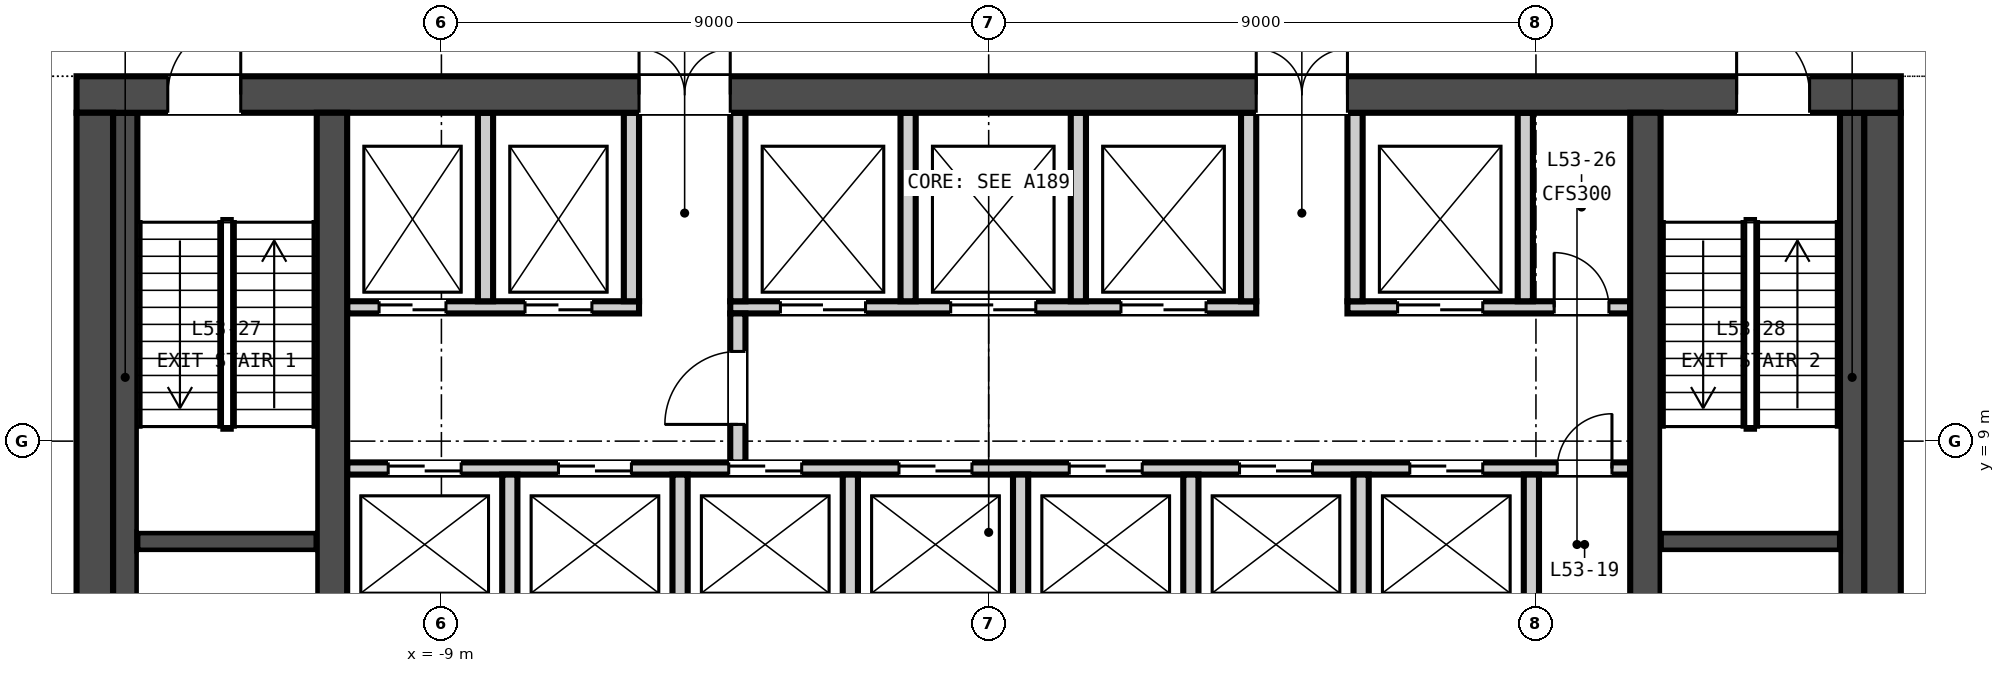
"""IFC4 building model, lengths in metres.
Left out: names, types, materials, properties, quantities, classifications, styles, units other than length and angle.
Written with IfcOpenShell. Run it as: python <this file> out.ifc"""

import sys

from ifc_helpers import new_model, si_unit, direction, frame, frame_2d, origin, place, context, subcontext, project, spatial, rectangle, extrude, element, fill, save


model = new_model("IFC4")
c1 = context("Model", 3, precision=1e-05, world=origin(), true_north=direction((0.0, 1.0)))
c2 = subcontext(c1, "Body", "Model", "MODEL_VIEW")
j1 = project(units=[si_unit("LENGTHUNIT", "METRE"), si_unit("PLANEANGLEUNIT", "RADIAN")], contexts=[c1])
p1 = place(None, origin())
s1 = spatial("IfcSite", under=j1, at=p1, CompositionType="ELEMENT")
p2 = place(p1, origin())
s2 = spatial("IfcBuilding", under=s1, at=p2, CompositionType="ELEMENT")
p3 = place(p2, frame((0.0, 0.0, 211.8)))
s3 = spatial("IfcBuildingStorey", under=s2, at=p3, CompositionType="ELEMENT", Elevation=211.8)
p4 = place(p3, frame((-15.0, 14.7, -0.3), z_axis=(0.0, 0.0, 1.0), x_axis=(1.0, 0.0, 0.0)))
e1 = element("IfcWall", 1, at=p4, inside=s3, PredefinedType="SOLIDWALL", context=c2, shape_type="SweptSolid", body=[
    extrude(rectangle(XDim=30.0, YDim=0.6, at=frame_2d((15.0, 0.0))), origin(), (0.0, 0.0, 1.0), 4.65),
])
p5 = place(p4, frame((9.25, 0.0, 0.3)))
e2 = element("IfcOpeningElement", 2, at=p5, cuts=e1, PredefinedType="OPENING", context=c2, shape_type="SweptSolid", body=[
    extrude(rectangle(XDim=1.5, YDim=2.1, at=frame_2d((0.75, 1.05))), frame((0.0, 0.31, 0.0), z_axis=(0.0, -1.0, 0.0), x_axis=(1.0, 0.0, 0.0)), (0.0, 0.0, 1.0), 0.62),
])
p6 = place(p4, frame((19.4, 0.0, 0.3)))
e3 = element("IfcOpeningElement", 3, at=p6, cuts=e1, PredefinedType="OPENING", context=c2, shape_type="SweptSolid", body=[
    extrude(rectangle(XDim=1.5, YDim=2.1, at=frame_2d((0.75, 1.05))), frame((0.0, 0.31, 0.0), z_axis=(0.0, -1.0, 0.0), x_axis=(1.0, 0.0, 0.0)), (0.0, 0.0, 1.0), 0.62),
])
p7 = place(p4, frame((1.5, 0.0, 0.3)))
e4 = element("IfcOpeningElement", 4, at=p7, cuts=e1, PredefinedType="OPENING", context=c2, shape_type="SweptSolid", body=[
    extrude(rectangle(XDim=1.2, YDim=2.1, at=frame_2d((0.6, 1.05))), frame((0.0, 0.31, 0.0), z_axis=(0.0, -1.0, 0.0), x_axis=(1.0, 0.0, 0.0)), (0.0, 0.0, 1.0), 0.62),
])
p8 = place(p4, frame((27.3, 0.0, 0.3)))
e5 = element("IfcOpeningElement", 5, at=p8, cuts=e1, PredefinedType="OPENING", context=c2, shape_type="SweptSolid", body=[
    extrude(rectangle(XDim=1.2, YDim=2.1, at=frame_2d((0.6, 1.05))), frame((0.0, 0.31, 0.0), z_axis=(0.0, -1.0, 0.0), x_axis=(1.0, 0.0, 0.0)), (0.0, 0.0, 1.0), 0.62),
])
for number, where, z_axis, x_axis in (
    (6, (-14.7, 0.6, -0.3), (0.0, 0.0, 1.0), (0.0, 1.0, 0.0)),
    (7, (14.7, 0.6, -0.3), (0.0, 0.0, 1.0), (0.0, 1.0, 0.0)),
):
    element("IfcWall", number, at=place(p3, frame(where, z_axis=z_axis, x_axis=x_axis)), inside=s3, PredefinedType="SOLIDWALL", context=c2, shape_type="SweptSolid", body=[
        extrude(rectangle(XDim=13.8, YDim=0.6, at=frame_2d((6.9, 0.0))), origin(), (0.0, 0.0, 1.0), 4.65),
    ])
for number, where, z_axis, x_axis in (
    (8, (-10.8, 0.6, -0.3), (0.0, 0.0, 1.0), (0.0, 1.0, 0.0)),
    (9, (10.8, 0.6, -0.3), (0.0, 0.0, 1.0), (0.0, 1.0, 0.0)),
):
    element("IfcWall", number, at=place(p3, frame(where, z_axis=z_axis, x_axis=x_axis)), inside=s3, PredefinedType="SOLIDWALL", context=c2, shape_type="SweptSolid", body=[
        extrude(rectangle(XDim=13.8, YDim=0.5, at=frame_2d((6.9, 0.0))), origin(), (0.0, 0.0, 1.0), 4.65),
    ])
p9 = place(p3, frame((-10.55, 8.55, 0.0), z_axis=(0.0, 0.0, 1.0), x_axis=(1.0, 0.0, 0.0)))
e10 = element("IfcWall", 10, at=p9, inside=s3, PredefinedType="PARTITIONING", context=c2, shape_type="SweptSolid", body=[
    extrude(rectangle(XDim=21.1, YDim=0.2, at=frame_2d((10.55, 0.0))), origin(), (0.0, 0.0, 1.0), 4.35),
])
p10 = place(p9, frame((0.675, 0.0, 0.0)))
e11 = element("IfcOpeningElement", 11, at=p10, cuts=e10, PredefinedType="OPENING", context=c2, shape_type="SweptSolid", body=[
    extrude(rectangle(XDim=1.2, YDim=2.1, at=frame_2d((0.6, 1.05))), frame((0.0, 0.11, 0.0), z_axis=(0.0, -1.0, 0.0), x_axis=(1.0, 0.0, 0.0)), (0.0, 0.0, 1.0), 0.22),
])
p11 = place(p9, frame((3.475, 0.0, 0.0)))
e12 = element("IfcOpeningElement", 12, at=p11, cuts=e10, PredefinedType="OPENING", context=c2, shape_type="SweptSolid", body=[
    extrude(rectangle(XDim=1.2, YDim=2.1, at=frame_2d((0.6, 1.05))), frame((0.0, 0.11, 0.0), z_axis=(0.0, -1.0, 0.0), x_axis=(1.0, 0.0, 0.0)), (0.0, 0.0, 1.0), 0.22),
])
p12 = place(p9, frame((6.275, 0.0, 0.0)))
e13 = element("IfcOpeningElement", 13, at=p12, cuts=e10, PredefinedType="OPENING", context=c2, shape_type="SweptSolid", body=[
    extrude(rectangle(XDim=1.2, YDim=2.1, at=frame_2d((0.6, 1.05))), frame((0.0, 0.11, 0.0), z_axis=(0.0, -1.0, 0.0), x_axis=(1.0, 0.0, 0.0)), (0.0, 0.0, 1.0), 0.22),
])
p13 = place(p9, frame((9.075, 0.0, 0.0)))
e14 = element("IfcOpeningElement", 14, at=p13, cuts=e10, PredefinedType="OPENING", context=c2, shape_type="SweptSolid", body=[
    extrude(rectangle(XDim=1.2, YDim=2.1, at=frame_2d((0.6, 1.05))), frame((0.0, 0.11, 0.0), z_axis=(0.0, -1.0, 0.0), x_axis=(1.0, 0.0, 0.0)), (0.0, 0.0, 1.0), 0.22),
])
p14 = place(p9, frame((11.875, 0.0, 0.0)))
e15 = element("IfcOpeningElement", 15, at=p14, cuts=e10, PredefinedType="OPENING", context=c2, shape_type="SweptSolid", body=[
    extrude(rectangle(XDim=1.2, YDim=2.1, at=frame_2d((0.6, 1.05))), frame((0.0, 0.11, 0.0), z_axis=(0.0, -1.0, 0.0), x_axis=(1.0, 0.0, 0.0)), (0.0, 0.0, 1.0), 0.22),
])
p15 = place(p9, frame((14.675, 0.0, 0.0)))
e16 = element("IfcOpeningElement", 16, at=p15, cuts=e10, PredefinedType="OPENING", context=c2, shape_type="SweptSolid", body=[
    extrude(rectangle(XDim=1.2, YDim=2.1, at=frame_2d((0.6, 1.05))), frame((0.0, 0.11, 0.0), z_axis=(0.0, -1.0, 0.0), x_axis=(1.0, 0.0, 0.0)), (0.0, 0.0, 1.0), 0.22),
])
p16 = place(p9, frame((17.475, 0.0, 0.0)))
e17 = element("IfcOpeningElement", 17, at=p16, cuts=e10, PredefinedType="OPENING", context=c2, shape_type="SweptSolid", body=[
    extrude(rectangle(XDim=1.2, YDim=2.1, at=frame_2d((0.6, 1.05))), frame((0.0, 0.11, 0.0), z_axis=(0.0, -1.0, 0.0), x_axis=(1.0, 0.0, 0.0)), (0.0, 0.0, 1.0), 0.22),
])
p17 = place(p9, frame((19.9, 0.0, 0.0)))
e18 = element("IfcOpeningElement", 18, at=p17, cuts=e10, PredefinedType="OPENING", context=c2, shape_type="SweptSolid", body=[
    extrude(rectangle(XDim=0.9, YDim=2.1, at=frame_2d((0.45, 1.05))), frame((0.0, 0.11, 0.0), z_axis=(0.0, -1.0, 0.0), x_axis=(1.0, 0.0, 0.0)), (0.0, 0.0, 1.0), 0.22),
])
p18 = place(p3, frame((-10.55, 11.2, 0.0), z_axis=(0.0, 0.0, 1.0), x_axis=(1.0, 0.0, 0.0)))
e19 = element("IfcWall", 19, at=p18, inside=s3, PredefinedType="PARTITIONING", context=c2, shape_type="SweptSolid", body=[
    extrude(rectangle(XDim=4.8, YDim=0.2, at=frame_2d((2.4, 0.0))), origin(), (0.0, 0.0, 1.0), 4.35),
])
p19 = place(p18, frame((0.525, 0.0, 0.0)))
e20 = element("IfcOpeningElement", 20, at=p19, cuts=e19, PredefinedType="OPENING", context=c2, shape_type="SweptSolid", body=[
    extrude(rectangle(XDim=1.1, YDim=2.1, at=frame_2d((0.55, 1.05))), frame((0.0, 0.11, 0.0), z_axis=(0.0, -1.0, 0.0), x_axis=(1.0, 0.0, 0.0)), (0.0, 0.0, 1.0), 0.22),
])
p20 = place(p18, frame((2.925, 0.0, 0.0)))
e21 = element("IfcOpeningElement", 21, at=p20, cuts=e19, PredefinedType="OPENING", context=c2, shape_type="SweptSolid", body=[
    extrude(rectangle(XDim=1.1, YDim=2.1, at=frame_2d((0.55, 1.05))), frame((0.0, 0.11, 0.0), z_axis=(0.0, -1.0, 0.0), x_axis=(1.0, 0.0, 0.0)), (0.0, 0.0, 1.0), 0.22),
])
p21 = place(p3, frame((-4.25, 11.2, 0.0), z_axis=(0.0, 0.0, 1.0), x_axis=(1.0, 0.0, 0.0)))
e22 = element("IfcWall", 22, at=p21, inside=s3, PredefinedType="PARTITIONING", context=c2, shape_type="SweptSolid", body=[
    extrude(rectangle(XDim=8.65, YDim=0.2, at=frame_2d((4.325, 0.0))), origin(), (0.0, 0.0, 1.0), 4.35),
])
p22 = place(p21, frame((0.825, 0.0, 0.0)))
e23 = element("IfcOpeningElement", 23, at=p22, cuts=e22, PredefinedType="OPENING", context=c2, shape_type="SweptSolid", body=[
    extrude(rectangle(XDim=1.4, YDim=2.1, at=frame_2d((0.7, 1.05))), frame((0.0, 0.11, 0.0), z_axis=(0.0, -1.0, 0.0), x_axis=(1.0, 0.0, 0.0)), (0.0, 0.0, 1.0), 0.22),
])
p23 = place(p21, frame((3.625, 0.0, 0.0)))
e24 = element("IfcOpeningElement", 24, at=p23, cuts=e22, PredefinedType="OPENING", context=c2, shape_type="SweptSolid", body=[
    extrude(rectangle(XDim=1.4, YDim=2.1, at=frame_2d((0.7, 1.05))), frame((0.0, 0.11, 0.0), z_axis=(0.0, -1.0, 0.0), x_axis=(1.0, 0.0, 0.0)), (0.0, 0.0, 1.0), 0.22),
])
p24 = place(p21, frame((6.425, 0.0, 0.0)))
e25 = element("IfcOpeningElement", 25, at=p24, cuts=e22, PredefinedType="OPENING", context=c2, shape_type="SweptSolid", body=[
    extrude(rectangle(XDim=1.4, YDim=2.1, at=frame_2d((0.7, 1.05))), frame((0.0, 0.11, 0.0), z_axis=(0.0, -1.0, 0.0), x_axis=(1.0, 0.0, 0.0)), (0.0, 0.0, 1.0), 0.22),
])
p25 = place(p3, frame((5.9, 11.2, 0.0), z_axis=(0.0, 0.0, 1.0), x_axis=(1.0, 0.0, 0.0)))
e26 = element("IfcWall", 26, at=p25, inside=s3, PredefinedType="PARTITIONING", context=c2, shape_type="SweptSolid", body=[
    extrude(rectangle(XDim=4.65, YDim=0.2, at=frame_2d((2.325, 0.0))), origin(), (0.0, 0.0, 1.0), 4.35),
])
p26 = place(p25, frame((0.825, 0.0, 0.0)))
e27 = element("IfcOpeningElement", 27, at=p26, cuts=e26, PredefinedType="OPENING", context=c2, shape_type="SweptSolid", body=[
    extrude(rectangle(XDim=1.4, YDim=2.1, at=frame_2d((0.7, 1.05))), frame((0.0, 0.11, 0.0), z_axis=(0.0, -1.0, 0.0), x_axis=(1.0, 0.0, 0.0)), (0.0, 0.0, 1.0), 0.22),
])
p27 = place(p25, frame((3.4, 0.0, 0.0)))
e28 = element("IfcOpeningElement", 28, at=p27, cuts=e26, PredefinedType="OPENING", context=c2, shape_type="SweptSolid", body=[
    extrude(rectangle(XDim=0.9, YDim=2.1, at=frame_2d((0.45, 1.05))), frame((0.0, 0.11, 0.0), z_axis=(0.0, -1.0, 0.0), x_axis=(1.0, 0.0, 0.0)), (0.0, 0.0, 1.0), 0.22),
])
p28 = place(p3, frame((-4.125, 8.65, 0.0), z_axis=(0.0, 0.0, 1.0), x_axis=(0.0, 1.0, 0.0)))
e29 = element("IfcWall", 29, at=p28, inside=s3, PredefinedType="PARTITIONING", context=c2, shape_type="SweptSolid", body=[
    extrude(rectangle(XDim=2.45, YDim=0.25, at=frame_2d((1.225, 0.0))), origin(), (0.0, 0.0, 1.0), 4.35),
])
p29 = place(p28, frame((0.625, 0.0, 0.0)))
e30 = element("IfcOpeningElement", 30, at=p29, cuts=e29, PredefinedType="OPENING", context=c2, shape_type="SweptSolid", body=[
    extrude(rectangle(XDim=1.2, YDim=2.1, at=frame_2d((0.6, 1.05))), frame((0.0, 0.135, 0.0), z_axis=(0.0, -1.0, 0.0), x_axis=(1.0, 0.0, 0.0)), (0.0, 0.0, 1.0), 0.27),
])
for number, where, z_axis, x_axis in (
    (31, (-7.875, 6.15, 0.0), (0.0, 0.0, 1.0), (0.0, 1.0, 0.0)),
    (32, (-5.075, 6.15, 0.0), (0.0, 0.0, 1.0), (0.0, 1.0, 0.0)),
    (33, (-2.275, 6.15, 0.0), (0.0, 0.0, 1.0), (0.0, 1.0, 0.0)),
    (34, (0.525, 6.15, 0.0), (0.0, 0.0, 1.0), (0.0, 1.0, 0.0)),
    (35, (3.325, 6.15, 0.0), (0.0, 0.0, 1.0), (0.0, 1.0, 0.0)),
    (36, (6.125, 6.15, 0.0), (0.0, 0.0, 1.0), (0.0, 1.0, 0.0)),
    (37, (8.925, 6.15, 0.0), (0.0, 0.0, 1.0), (0.0, 1.0, 0.0)),
):
    element("IfcWall", number, at=place(p3, frame(where, z_axis=z_axis, x_axis=x_axis)), inside=s3, PredefinedType="PARTITIONING", context=c2, shape_type="SweptSolid", body=[
        extrude(rectangle(XDim=2.3, YDim=0.25, at=frame_2d((1.15, 0.0))), origin(), (0.0, 0.0, 1.0), 4.35),
    ])
for number, where, z_axis, x_axis in (
    (38, (-8.275, 11.3, 0.0), (0.0, 0.0, 1.0), (0.0, 1.0, 0.0)),
    (39, (-5.875, 11.3, 0.0), (0.0, 0.0, 1.0), (0.0, 1.0, 0.0)),
    (40, (-4.125, 11.3, 0.0), (0.0, 0.0, 1.0), (0.0, 1.0, 0.0)),
    (41, (-1.325, 11.3, 0.0), (0.0, 0.0, 1.0), (0.0, 1.0, 0.0)),
    (42, (1.475, 11.3, 0.0), (0.0, 0.0, 1.0), (0.0, 1.0, 0.0)),
    (43, (4.275, 11.3, 0.0), (0.0, 0.0, 1.0), (0.0, 1.0, 0.0)),
    (44, (6.025, 11.3, 0.0), (0.0, 0.0, 1.0), (0.0, 1.0, 0.0)),
    (45, (8.825, 11.3, 0.0), (0.0, 0.0, 1.0), (0.0, 1.0, 0.0)),
):
    element("IfcWall", number, at=place(p3, frame(where, z_axis=z_axis, x_axis=x_axis)), inside=s3, PredefinedType="PARTITIONING", context=c2, shape_type="SweptSolid", body=[
        extrude(rectangle(XDim=3.1, YDim=0.25, at=frame_2d((1.55, 0.0))), origin(), (0.0, 0.0, 1.0), 4.35),
    ])
p30 = place(p3, frame((-14.0, 7.35, 0.0), z_axis=(0.0, 0.0, 1.0), x_axis=(1.0, 0.0, 0.0)))
e46 = element("IfcWall", 46, at=p30, inside=s3, PredefinedType="SOLIDWALL", context=c2, shape_type="SweptSolid", body=[
    extrude(rectangle(XDim=2.95, YDim=0.3, at=frame_2d((1.475, 0.0))), origin(), (0.0, 0.0, 1.0), 4.35),
])
p31 = place(p3, frame((-14.2, 0.6, 0.0), z_axis=(0.0, 0.0, 1.0), x_axis=(0.0, 1.0, 0.0)))
e47 = element("IfcWall", 47, at=p31, inside=s3, PredefinedType="SOLIDWALL", context=c2, shape_type="SweptSolid", body=[
    extrude(rectangle(XDim=13.8, YDim=0.4, at=frame_2d((6.9, 0.0))), origin(), (0.0, 0.0, 1.0), 4.35),
])
p32 = place(p3, frame((11.05, 7.35, 0.0), z_axis=(0.0, 0.0, 1.0), x_axis=(1.0, 0.0, 0.0)))
e48 = element("IfcWall", 48, at=p32, inside=s3, PredefinedType="SOLIDWALL", context=c2, shape_type="SweptSolid", body=[
    extrude(rectangle(XDim=2.95, YDim=0.3, at=frame_2d((1.475, 0.0))), origin(), (0.0, 0.0, 1.0), 4.35),
])
p33 = place(p3, frame((14.2, 0.6, 0.0), z_axis=(0.0, 0.0, 1.0), x_axis=(0.0, 1.0, 0.0)))
e49 = element("IfcWall", 49, at=p33, inside=s3, PredefinedType="SOLIDWALL", context=c2, shape_type="SweptSolid", body=[
    extrude(rectangle(XDim=13.8, YDim=0.4, at=frame_2d((6.9, 0.0))), origin(), (0.0, 0.0, 1.0), 4.35),
])
p34 = place(p29, origin())
e50 = element("IfcDoor", 50, at=p34, inside=s3, OperationType="SINGLE_SWING_LEFT", PredefinedType="DOOR", context=c2, shape_type="SweptSolid", body=[
    extrude(rectangle(XDim=1.2, YDim=2.1, at=frame_2d((0.6, 1.05))), frame((0.0, 0.025, 0.0), z_axis=(0.0, -1.0, 0.0), x_axis=(1.0, 0.0, 0.0)), (0.0, 0.0, 1.0), 0.05),
])
fill(e30, e50)
p35 = place(p10, origin())
e51 = element("IfcDoor", 51, at=p35, inside=s3, OperationType="DOUBLE_DOOR_SLIDING", PredefinedType="DOOR", context=c2, shape_type="SweptSolid", body=[
    extrude(rectangle(XDim=1.2, YDim=2.1, at=frame_2d((0.6, 1.05))), frame((0.0, 0.025, 0.0), z_axis=(0.0, -1.0, 0.0), x_axis=(1.0, 0.0, 0.0)), (0.0, 0.0, 1.0), 0.05),
])
fill(e11, e51)
p36 = place(p11, origin())
e52 = element("IfcDoor", 52, at=p36, inside=s3, OperationType="DOUBLE_DOOR_SLIDING", PredefinedType="DOOR", context=c2, shape_type="SweptSolid", body=[
    extrude(rectangle(XDim=1.2, YDim=2.1, at=frame_2d((0.6, 1.05))), frame((0.0, 0.025, 0.0), z_axis=(0.0, -1.0, 0.0), x_axis=(1.0, 0.0, 0.0)), (0.0, 0.0, 1.0), 0.05),
])
fill(e12, e52)
p37 = place(p12, origin())
e53 = element("IfcDoor", 53, at=p37, inside=s3, OperationType="DOUBLE_DOOR_SLIDING", PredefinedType="DOOR", context=c2, shape_type="SweptSolid", body=[
    extrude(rectangle(XDim=1.2, YDim=2.1, at=frame_2d((0.6, 1.05))), frame((0.0, 0.025, 0.0), z_axis=(0.0, -1.0, 0.0), x_axis=(1.0, 0.0, 0.0)), (0.0, 0.0, 1.0), 0.05),
])
fill(e13, e53)
p38 = place(p13, origin())
e54 = element("IfcDoor", 54, at=p38, inside=s3, OperationType="DOUBLE_DOOR_SLIDING", PredefinedType="DOOR", context=c2, shape_type="SweptSolid", body=[
    extrude(rectangle(XDim=1.2, YDim=2.1, at=frame_2d((0.6, 1.05))), frame((0.0, 0.025, 0.0), z_axis=(0.0, -1.0, 0.0), x_axis=(1.0, 0.0, 0.0)), (0.0, 0.0, 1.0), 0.05),
])
fill(e14, e54)
p39 = place(p14, origin())
e55 = element("IfcDoor", 55, at=p39, inside=s3, OperationType="DOUBLE_DOOR_SLIDING", PredefinedType="DOOR", context=c2, shape_type="SweptSolid", body=[
    extrude(rectangle(XDim=1.2, YDim=2.1, at=frame_2d((0.6, 1.05))), frame((0.0, 0.025, 0.0), z_axis=(0.0, -1.0, 0.0), x_axis=(1.0, 0.0, 0.0)), (0.0, 0.0, 1.0), 0.05),
])
fill(e15, e55)
p40 = place(p15, origin())
e56 = element("IfcDoor", 56, at=p40, inside=s3, OperationType="DOUBLE_DOOR_SLIDING", PredefinedType="DOOR", context=c2, shape_type="SweptSolid", body=[
    extrude(rectangle(XDim=1.2, YDim=2.1, at=frame_2d((0.6, 1.05))), frame((0.0, 0.025, 0.0), z_axis=(0.0, -1.0, 0.0), x_axis=(1.0, 0.0, 0.0)), (0.0, 0.0, 1.0), 0.05),
])
fill(e16, e56)
p41 = place(p16, origin())
e57 = element("IfcDoor", 57, at=p41, inside=s3, OperationType="DOUBLE_DOOR_SLIDING", PredefinedType="DOOR", context=c2, shape_type="SweptSolid", body=[
    extrude(rectangle(XDim=1.2, YDim=2.1, at=frame_2d((0.6, 1.05))), frame((0.0, 0.025, 0.0), z_axis=(0.0, -1.0, 0.0), x_axis=(1.0, 0.0, 0.0)), (0.0, 0.0, 1.0), 0.05),
])
fill(e17, e57)
p42 = place(p17, origin())
e58 = element("IfcDoor", 58, at=p42, inside=s3, OperationType="SINGLE_SWING_RIGHT", PredefinedType="DOOR", context=c2, shape_type="SweptSolid", body=[
    extrude(rectangle(XDim=0.9, YDim=2.1, at=frame_2d((0.45, 1.05))), frame((0.0, 0.025, 0.0), z_axis=(0.0, -1.0, 0.0), x_axis=(1.0, 0.0, 0.0)), (0.0, 0.0, 1.0), 0.05),
])
fill(e18, e58)
p43 = place(p19, origin())
e59 = element("IfcDoor", 59, at=p43, inside=s3, OperationType="DOUBLE_DOOR_SLIDING", PredefinedType="DOOR", context=c2, shape_type="SweptSolid", body=[
    extrude(rectangle(XDim=1.1, YDim=2.1, at=frame_2d((0.55, 1.05))), frame((0.0, 0.025, 0.0), z_axis=(0.0, -1.0, 0.0), x_axis=(1.0, 0.0, 0.0)), (0.0, 0.0, 1.0), 0.05),
])
fill(e20, e59)
p44 = place(p20, origin())
e60 = element("IfcDoor", 60, at=p44, inside=s3, OperationType="DOUBLE_DOOR_SLIDING", PredefinedType="DOOR", context=c2, shape_type="SweptSolid", body=[
    extrude(rectangle(XDim=1.1, YDim=2.1, at=frame_2d((0.55, 1.05))), frame((0.0, 0.025, 0.0), z_axis=(0.0, -1.0, 0.0), x_axis=(1.0, 0.0, 0.0)), (0.0, 0.0, 1.0), 0.05),
])
fill(e21, e60)
p45 = place(p22, origin())
e61 = element("IfcDoor", 61, at=p45, inside=s3, OperationType="DOUBLE_DOOR_SLIDING", PredefinedType="DOOR", context=c2, shape_type="SweptSolid", body=[
    extrude(rectangle(XDim=1.4, YDim=2.1, at=frame_2d((0.7, 1.05))), frame((0.0, 0.025, 0.0), z_axis=(0.0, -1.0, 0.0), x_axis=(1.0, 0.0, 0.0)), (0.0, 0.0, 1.0), 0.05),
])
fill(e23, e61)
p46 = place(p23, origin())
e62 = element("IfcDoor", 62, at=p46, inside=s3, OperationType="DOUBLE_DOOR_SLIDING", PredefinedType="DOOR", context=c2, shape_type="SweptSolid", body=[
    extrude(rectangle(XDim=1.4, YDim=2.1, at=frame_2d((0.7, 1.05))), frame((0.0, 0.025, 0.0), z_axis=(0.0, -1.0, 0.0), x_axis=(1.0, 0.0, 0.0)), (0.0, 0.0, 1.0), 0.05),
])
fill(e24, e62)
p47 = place(p24, origin())
e63 = element("IfcDoor", 63, at=p47, inside=s3, OperationType="DOUBLE_DOOR_SLIDING", PredefinedType="DOOR", context=c2, shape_type="SweptSolid", body=[
    extrude(rectangle(XDim=1.4, YDim=2.1, at=frame_2d((0.7, 1.05))), frame((0.0, 0.025, 0.0), z_axis=(0.0, -1.0, 0.0), x_axis=(1.0, 0.0, 0.0)), (0.0, 0.0, 1.0), 0.05),
])
fill(e25, e63)
p48 = place(p26, origin())
e64 = element("IfcDoor", 64, at=p48, inside=s3, OperationType="DOUBLE_DOOR_SLIDING", PredefinedType="DOOR", context=c2, shape_type="SweptSolid", body=[
    extrude(rectangle(XDim=1.4, YDim=2.1, at=frame_2d((0.7, 1.05))), frame((0.0, 0.025, 0.0), z_axis=(0.0, -1.0, 0.0), x_axis=(1.0, 0.0, 0.0)), (0.0, 0.0, 1.0), 0.05),
])
fill(e27, e64)
p49 = place(p27, origin())
e65 = element("IfcDoor", 65, at=p49, inside=s3, OperationType="SINGLE_SWING_LEFT", PredefinedType="DOOR", context=c2, shape_type="SweptSolid", body=[
    extrude(rectangle(XDim=0.9, YDim=2.1, at=frame_2d((0.45, 1.05))), frame((0.0, 0.025, 0.0), z_axis=(0.0, -1.0, 0.0), x_axis=(1.0, 0.0, 0.0)), (0.0, 0.0, 1.0), 0.05),
])
fill(e28, e65)
p50 = place(p5, origin())
e66 = element("IfcDoor", 66, at=p50, inside=s3, OperationType="DOUBLE_DOOR_SINGLE_SWING", PredefinedType="DOOR", context=c2, shape_type="SweptSolid", body=[
    extrude(rectangle(XDim=1.5, YDim=2.1, at=frame_2d((0.75, 1.05))), frame((0.0, 0.025, 0.0), z_axis=(0.0, -1.0, 0.0), x_axis=(1.0, 0.0, 0.0)), (0.0, 0.0, 1.0), 0.05),
])
fill(e2, e66)
p51 = place(p6, origin())
e67 = element("IfcDoor", 67, at=p51, inside=s3, OperationType="DOUBLE_DOOR_SINGLE_SWING", PredefinedType="DOOR", context=c2, shape_type="SweptSolid", body=[
    extrude(rectangle(XDim=1.5, YDim=2.1, at=frame_2d((0.75, 1.05))), frame((0.0, 0.025, 0.0), z_axis=(0.0, -1.0, 0.0), x_axis=(1.0, 0.0, 0.0)), (0.0, 0.0, 1.0), 0.05),
])
fill(e3, e67)
p52 = place(p7, origin())
e68 = element("IfcDoor", 68, at=p52, inside=s3, OperationType="SINGLE_SWING_RIGHT", PredefinedType="DOOR", context=c2, shape_type="SweptSolid", body=[
    extrude(rectangle(XDim=1.2, YDim=2.1, at=frame_2d((0.6, 1.05))), frame((0.0, 0.025, 0.0), z_axis=(0.0, -1.0, 0.0), x_axis=(1.0, 0.0, 0.0)), (0.0, 0.0, 1.0), 0.05),
])
fill(e4, e68)
p53 = place(p8, origin())
e69 = element("IfcDoor", 69, at=p53, inside=s3, OperationType="SINGLE_SWING_LEFT", PredefinedType="DOOR", context=c2, shape_type="SweptSolid", body=[
    extrude(rectangle(XDim=1.2, YDim=2.1, at=frame_2d((0.6, 1.05))), frame((0.0, 0.025, 0.0), z_axis=(0.0, -1.0, 0.0), x_axis=(1.0, 0.0, 0.0)), (0.0, 0.0, 1.0), 0.05),
])
fill(e5, e69)
save(model, sys.argv[1])
